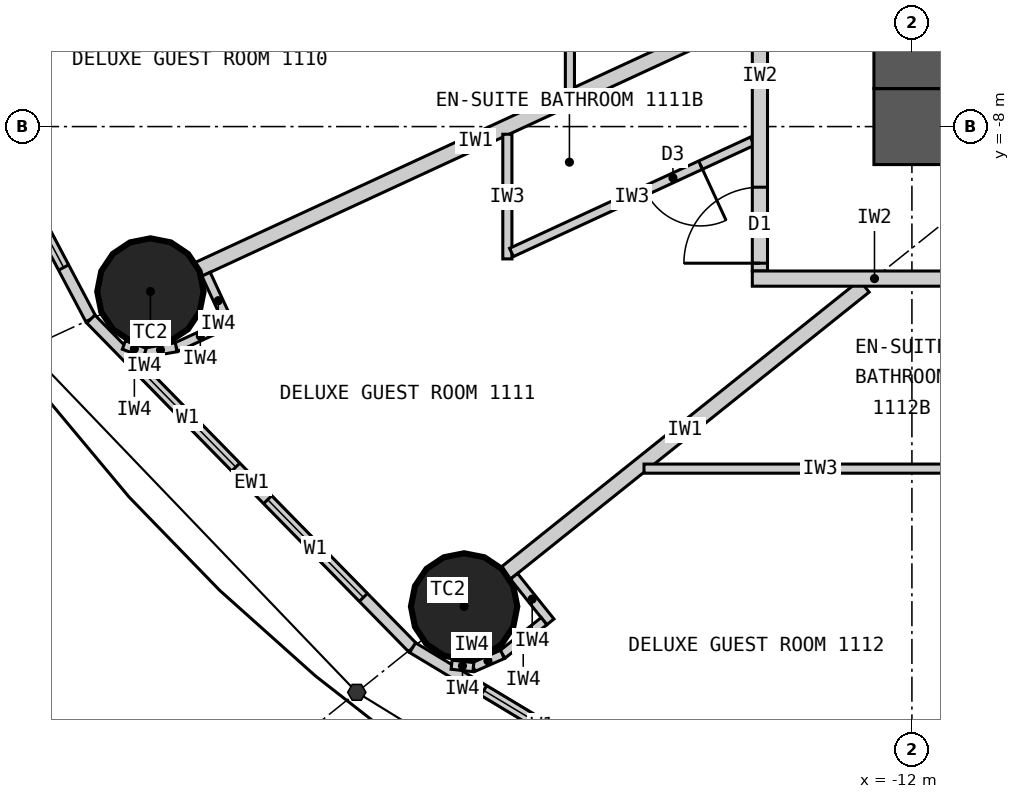
"""IFC4 building model, lengths in metres.
Left out: names, types, materials, properties, quantities, classifications, styles, units other than length and angle.
Written with IfcOpenShell. Run it as: python <this file> out.ifc"""

import sys

from ifc_helpers import new_model, si_unit, direction, frame, frame_2d, origin, origin_2d, place, context, subcontext, project, spatial, rectangle, circle, extrude, element, fill, save


model = new_model("IFC4")
c1 = context("Model", 3, precision=1e-05, world=origin(), true_north=direction((0.0, 1.0)))
c2 = subcontext(c1, "Body", "Model", "MODEL_VIEW")
j1 = project(units=[si_unit("LENGTHUNIT", "METRE"), si_unit("PLANEANGLEUNIT", "RADIAN")], contexts=[c1])
p1 = place(None, origin())
s1 = spatial("IfcSite", under=j1, at=p1, CompositionType="ELEMENT")
p2 = place(p1, origin())
s2 = spatial("IfcBuilding", under=s1, at=p2, CompositionType="ELEMENT")
p3 = place(p2, frame((0.0, 0.0, 50.7)))
s3 = spatial("IfcBuildingStorey", under=s2, at=p3, CompositionType="ELEMENT", Elevation=50.7)
for number, where, z_axis, x_axis in (
    (1, (-22.019, -10.17, 0.0), (0.0, 0.0, 1.0), (1.0, 0.0, 0.0)),
    (2, (-17.892, -14.313, 0.0), (0.0, 0.0, 1.0), (1.0, 0.0, 0.0)),
):
    element("IfcColumn", number, at=place(p3, frame(where, z_axis=z_axis, x_axis=x_axis)), inside=s3, PredefinedType="COLUMN", context=c2, shape_type="SweptSolid", body=[
        extrude(circle(Radius=0.7, at=origin_2d()), origin(), (0.0, 0.0, 1.0), 3.3),
    ])
p4 = place(p3, frame((12.5, -8.0, 0.0), z_axis=(0.0, 0.0, 1.0), x_axis=(-1.0, 0.0, 0.0)))
e3 = element("IfcWall", 3, at=p4, inside=s3, PredefinedType="SHEAR", context=c2, shape_type="SweptSolid", body=[
    extrude(rectangle(XDim=25.0, YDim=1.0, at=frame_2d((12.5, 0.0))), origin(), (0.0, 0.0, 1.0), 3.3),
])
p5 = place(p4, frame((11.2, 0.0, 0.0)))
e4 = element("IfcOpeningElement", 4, at=p5, cuts=e3, PredefinedType="OPENING", context=c2, shape_type="SweptSolid", body=[
    extrude(rectangle(XDim=1.2, YDim=2.2, at=frame_2d((0.6, 1.1))), frame((0.0, 0.51, 0.0), z_axis=(0.0, -1.0, 0.0), x_axis=(1.0, 0.0, 0.0)), (0.0, 0.0, 1.0), 1.02),
])
p6 = place(p4, frame((18.8, 0.0, 0.0)))
e5 = element("IfcOpeningElement", 5, at=p6, cuts=e3, PredefinedType="OPENING", context=c2, shape_type="SweptSolid", body=[
    extrude(rectangle(XDim=0.9, YDim=2.2, at=frame_2d((0.45, 1.1))), frame((0.0, 0.51, 0.0), z_axis=(0.0, -1.0, 0.0), x_axis=(1.0, 0.0, 0.0)), (0.0, 0.0, 1.0), 1.02),
])
p7 = place(p3, frame((-12.0, 7.5, 0.0), z_axis=(0.0, 0.0, 1.0), x_axis=(0.0, -1.0, 0.0)))
e6 = element("IfcWall", 6, at=p7, inside=s3, PredefinedType="SHEAR", context=c2, shape_type="SweptSolid", body=[
    extrude(rectangle(XDim=15.0, YDim=1.0, at=frame_2d((7.5, 0.0))), origin(), (0.0, 0.0, 1.0), 3.3),
])
p8 = place(p7, frame((6.6, 0.0, 0.0)))
e7 = element("IfcOpeningElement", 7, at=p8, cuts=e6, PredefinedType="OPENING", context=c2, shape_type="SweptSolid", body=[
    extrude(rectangle(XDim=1.8, YDim=2.2, at=frame_2d((0.9, 1.1))), frame((0.0, 0.51, 0.0), z_axis=(0.0, -1.0, 0.0), x_axis=(1.0, 0.0, 0.0)), (0.0, 0.0, 1.0), 1.02),
])
p9 = place(p3, frame((-25.482, -5.462, 0.0), z_axis=(0.0, 0.0, 1.0), x_axis=(0.467296867008, -0.884100468321, 0.0)))
e8 = element("IfcWall", 8, at=p9, inside=s3, PredefinedType="ELEMENTEDWALL", context=c2, shape_type="SweptSolid", body=[
    extrude(rectangle(XDim=5.734, YDim=0.15, at=frame_2d((2.867, 0.0))), origin(), (0.0, 0.0, 1.0), 3.12),
])
p10 = place(p9, frame((0.767, 0.0, 0.9)))
e9 = element("IfcOpeningElement", 9, at=p10, cuts=e8, PredefinedType="OPENING", context=c2, shape_type="SweptSolid", body=[
    extrude(rectangle(XDim=1.8, YDim=1.9, at=frame_2d((0.9, 0.95))), frame((0.0, 0.085, 0.0), z_axis=(0.0, -1.0, 0.0), x_axis=(1.0, 0.0, 0.0)), (0.0, 0.0, 1.0), 0.17),
])
p11 = place(p9, frame((3.167, 0.0, 0.9)))
e10 = element("IfcOpeningElement", 10, at=p11, cuts=e8, PredefinedType="OPENING", context=c2, shape_type="SweptSolid", body=[
    extrude(rectangle(XDim=1.8, YDim=1.9, at=frame_2d((0.9, 0.95))), frame((0.0, 0.085, 0.0), z_axis=(0.0, -1.0, 0.0), x_axis=(1.0, 0.0, 0.0)), (0.0, 0.0, 1.0), 0.17),
])
p12 = place(p3, frame((-22.803, -10.532, 0.0), z_axis=(0.0, 0.0, 1.0), x_axis=(0.699602905915, -0.714531856557, 0.0)))
e11 = element("IfcWall", 11, at=p12, inside=s3, PredefinedType="ELEMENTEDWALL", context=c2, shape_type="SweptSolid", body=[
    extrude(rectangle(XDim=6.051, YDim=0.15, at=frame_2d((3.025, 0.0))), origin(), (0.0, 0.0, 1.0), 3.12),
])
p13 = place(p12, frame((0.926, 0.0, 0.9)))
e12 = element("IfcOpeningElement", 12, at=p13, cuts=e11, PredefinedType="OPENING", context=c2, shape_type="SweptSolid", body=[
    extrude(rectangle(XDim=1.8, YDim=1.9, at=frame_2d((0.9, 0.95))), frame((0.0, 0.085, 0.0), z_axis=(0.0, -1.0, 0.0), x_axis=(1.0, 0.0, 0.0)), (0.0, 0.0, 1.0), 0.17),
])
p14 = place(p12, frame((3.325, 0.0, 0.9)))
e13 = element("IfcOpeningElement", 13, at=p14, cuts=e11, PredefinedType="OPENING", context=c2, shape_type="SweptSolid", body=[
    extrude(rectangle(XDim=1.8, YDim=1.9, at=frame_2d((0.9, 0.95))), frame((0.0, 0.085, 0.0), z_axis=(0.0, -1.0, 0.0), x_axis=(1.0, 0.0, 0.0)), (0.0, 0.0, 1.0), 0.17),
])
p15 = place(p3, frame((-18.57, -14.856, 0.0), z_axis=(0.0, 0.0, 1.0), x_axis=(0.856983180864, -0.515344377787, 0.0)))
e14 = element("IfcWall", 14, at=p15, inside=s3, PredefinedType="ELEMENTEDWALL", context=c2, shape_type="SweptSolid", body=[
    extrude(rectangle(XDim=6.386, YDim=0.15, at=frame_2d((3.193, 0.0))), origin(), (0.0, 0.0, 1.0), 3.12),
])
p16 = place(p15, frame((1.093, 0.0, 0.9)))
e15 = element("IfcOpeningElement", 15, at=p16, cuts=e14, PredefinedType="OPENING", context=c2, shape_type="SweptSolid", body=[
    extrude(rectangle(XDim=1.8, YDim=1.9, at=frame_2d((0.9, 0.95))), frame((0.0, 0.085, 0.0), z_axis=(0.0, -1.0, 0.0), x_axis=(1.0, 0.0, 0.0)), (0.0, 0.0, 1.0), 0.17),
])
p17 = place(p15, frame((3.493, 0.0, 0.9)))
e16 = element("IfcOpeningElement", 16, at=p17, cuts=e14, PredefinedType="OPENING", context=c2, shape_type="SweptSolid", body=[
    extrude(rectangle(XDim=1.8, YDim=1.9, at=frame_2d((0.9, 0.95))), frame((0.0, 0.085, 0.0), z_axis=(0.0, -1.0, 0.0), x_axis=(1.0, 0.0, 0.0)), (0.0, 0.0, 1.0), 0.17),
])
p18 = place(p3, frame((-14.1, -6.512, 0.0), z_axis=(0.0, 0.0, 1.0), x_axis=(-0.907832871056, -0.419332181247, 0.0)))
e17 = element("IfcWall", 17, at=p18, inside=s3, PredefinedType="PARTITIONING", context=c2, shape_type="SweptSolid", body=[
    extrude(rectangle(XDim=8.023, YDim=0.2, at=frame_2d((4.011, 0.0))), origin(), (0.0, 0.0, 1.0), 2.32),
])
p19 = place(p3, frame((-12.625, -10.1, 0.0), z_axis=(0.0, 0.0, 1.0), x_axis=(-0.780892451574, -0.624665493744, 0.0)))
e18 = element("IfcWall", 18, at=p19, inside=s3, PredefinedType="PARTITIONING", context=c2, shape_type="SweptSolid", body=[
    extrude(rectangle(XDim=6.045, YDim=0.2, at=frame_2d((3.022, 0.0))), origin(), (0.0, 0.0, 1.0), 2.32),
])
p20 = place(p3, frame((-7.289, -10.1, 0.0), z_axis=(0.0, 0.0, 1.0), x_axis=(-0.585198353053, -0.810890182197, 0.0)))
e19 = element("IfcWall", 19, at=p20, inside=s3, PredefinedType="PARTITIONING", context=c2, shape_type="SweptSolid", body=[
    extrude(rectangle(XDim=8.36, YDim=0.2, at=frame_2d((4.18, 0.0))), origin(), (0.0, 0.0, 1.0), 2.32),
])
p21 = place(p3, frame((-16.5, -7.521, 0.0), z_axis=(0.0, 0.0, 1.0), x_axis=(0.0, 1.0, 0.0)))
e20 = element("IfcWall", 20, at=p21, inside=s3, PredefinedType="PARTITIONING", context=c2, shape_type="SweptSolid", body=[
    extrude(rectangle(XDim=2.749, YDim=0.12, at=frame_2d((1.374, 0.0))), origin(), (0.0, 0.0, 1.0), 3.12),
])
p22 = place(p3, frame((-17.323, -8.101, 0.0), z_axis=(0.0, 0.0, 1.0), x_axis=(0.0, -1.0, 0.0)))
e21 = element("IfcWall", 21, at=p22, inside=s3, PredefinedType="PARTITIONING", context=c2, shape_type="SweptSolid", body=[
    extrude(rectangle(XDim=1.64, YDim=0.12, at=frame_2d((0.82, 0.0))), origin(), (0.0, 0.0, 1.0), 3.12),
])
p23 = place(p3, frame((-14.1, -8.193, 0.0), z_axis=(0.0, 0.0, 1.0), x_axis=(-0.907836493557, -0.419324338628, 0.0)))
e22 = element("IfcWall", 22, at=p23, inside=s3, PredefinedType="PARTITIONING", context=c2, shape_type="SweptSolid", body=[
    extrude(rectangle(XDim=3.49, YDim=0.12, at=frame_2d((1.745, 0.0))), origin(), (0.0, 0.0, 1.0), 3.12),
])
p24 = place(p23, frame((0.75, 0.0, 0.0)))
e23 = element("IfcOpeningElement", 23, at=p24, cuts=e22, PredefinedType="OPENING", context=c2, shape_type="SweptSolid", body=[
    extrude(rectangle(XDim=0.8, YDim=2.1, at=frame_2d((0.4, 1.05))), frame((0.0, 0.07, 0.0), z_axis=(0.0, -1.0, 0.0), x_axis=(1.0, 0.0, 0.0)), (0.0, 0.0, 1.0), 0.14),
])
p25 = place(p3, frame((-15.525, -12.5, 0.0), z_axis=(0.0, 0.0, 1.0), x_axis=(1.0, 0.0, 0.0)))
e24 = element("IfcWall", 24, at=p25, inside=s3, PredefinedType="PARTITIONING", context=c2, shape_type="SweptSolid", body=[
    extrude(rectangle(XDim=4.64, YDim=0.12, at=frame_2d((2.32, 0.0))), origin(), (0.0, 0.0, 1.0), 3.12),
])
p26 = place(p3, frame((-14.0, -4.772, 0.0), z_axis=(0.0, 0.0, 1.0), x_axis=(0.0, -1.0, 0.0)))
e25 = element("IfcWall", 25, at=p26, inside=s3, PredefinedType="PARTITIONING", context=c2, shape_type="SweptSolid", body=[
    extrude(rectangle(XDim=5.127, YDim=0.2, at=frame_2d((2.564, 0.0))), origin(), (0.0, 0.0, 1.0), 3.12),
])
p27 = place(p26, frame((4.025, 0.0, 0.0)))
e26 = element("IfcOpeningElement", 26, at=p27, cuts=e25, PredefinedType="OPENING", context=c2, shape_type="SweptSolid", body=[
    extrude(rectangle(XDim=1.0, YDim=2.2, at=frame_2d((0.5, 1.1))), frame((0.0, 0.11, 0.0), z_axis=(0.0, -1.0, 0.0), x_axis=(1.0, 0.0, 0.0)), (0.0, 0.0, 1.0), 0.22),
])
p28 = place(p3, frame((-10.885, -10.0, 0.0), z_axis=(0.0, 0.0, 1.0), x_axis=(-1.0, 0.0, 0.0)))
e27 = element("IfcWall", 27, at=p28, inside=s3, PredefinedType="PARTITIONING", context=c2, shape_type="SweptSolid", body=[
    extrude(rectangle(XDim=3.215, YDim=0.2, at=frame_2d((1.607, 0.0))), origin(), (0.0, 0.0, 1.0), 3.12),
])
p29 = place(p3, frame((-21.287, -9.942, 0.0), z_axis=(0.0, 0.0, 1.0), x_axis=(0.419259891039, -0.907866258744, 0.0)))
e28 = element("IfcWall", 28, at=p29, inside=s3, PredefinedType="PARTITIONING", context=c2, shape_type="SweptSolid", body=[
    extrude(rectangle(XDim=0.768, YDim=0.12, at=frame_2d((0.384, 0.0))), origin(), (0.0, 0.0, 1.0), 3.12),
])
p30 = place(p3, frame((-21.045, -10.61, 0.0), z_axis=(0.0, 0.0, 1.0), x_axis=(-0.907877701396, -0.419235112208, 0.0)))
e29 = element("IfcWall", 29, at=p30, inside=s3, PredefinedType="PARTITIONING", context=c2, shape_type="SweptSolid", body=[
    extrude(rectangle(XDim=0.7, YDim=0.12, at=frame_2d((0.35, 0.0))), origin(), (0.0, 0.0, 1.0), 3.12),
])
p31 = place(p3, frame((-21.68, -10.903, 0.0), z_axis=(0.0, 0.0, 1.0), x_axis=(-0.985446622073, -0.169985161247, 0.0)))
e30 = element("IfcWall", 30, at=p31, inside=s3, PredefinedType="PARTITIONING", context=c2, shape_type="SweptSolid", body=[
    extrude(rectangle(XDim=0.418, YDim=0.12, at=frame_2d((0.209, 0.0))), origin(), (0.0, 0.0, 1.0), 3.12),
])
p32 = place(p3, frame((-22.092, -10.974, 0.0), z_axis=(0.0, 0.0, 1.0), x_axis=(-0.938428160676, 0.345474437912, 0.0)))
e31 = element("IfcWall", 31, at=p32, inside=s3, PredefinedType="PARTITIONING", context=c2, shape_type="SweptSolid", body=[
    extrude(rectangle(XDim=0.294, YDim=0.12, at=frame_2d((0.147, 0.0))), origin(), (0.0, 0.0, 1.0), 3.12),
])
p33 = place(p3, frame((-17.236, -13.917, 0.0), z_axis=(0.0, 0.0, 1.0), x_axis=(0.624695047554, -0.780868809443, 0.0)))
e32 = element("IfcWall", 32, at=p33, inside=s3, PredefinedType="PARTITIONING", context=c2, shape_type="SweptSolid", body=[
    extrude(rectangle(XDim=0.768, YDim=0.12, at=frame_2d((0.384, 0.0))), origin(), (0.0, 0.0, 1.0), 3.12),
])
p34 = place(p3, frame((-16.841, -14.507, 0.0), z_axis=(0.0, 0.0, 1.0), x_axis=(-0.780902834923, -0.62465251333, 0.0)))
e33 = element("IfcWall", 33, at=p34, inside=s3, PredefinedType="PARTITIONING", context=c2, shape_type="SweptSolid", body=[
    extrude(rectangle(XDim=0.7, YDim=0.12, at=frame_2d((0.35, 0.0))), origin(), (0.0, 0.0, 1.0), 3.12),
])
p35 = place(p3, frame((-17.387, -14.944, 0.0), z_axis=(0.0, 0.0, 1.0), x_axis=(-0.916036698064, -0.401094462441, 0.0)))
e34 = element("IfcWall", 34, at=p35, inside=s3, PredefinedType="PARTITIONING", context=c2, shape_type="SweptSolid", body=[
    extrude(rectangle(XDim=0.418, YDim=0.12, at=frame_2d((0.209, 0.0))), origin(), (0.0, 0.0, 1.0), 3.12),
])
p36 = place(p3, frame((-17.77, -15.112, 0.0), z_axis=(0.0, 0.0, 1.0), x_axis=(-0.993904401174, 0.110245368731, 0.0)))
e35 = element("IfcWall", 35, at=p36, inside=s3, PredefinedType="PARTITIONING", context=c2, shape_type="SweptSolid", body=[
    extrude(rectangle(XDim=0.288, YDim=0.12, at=frame_2d((0.144, 0.0))), origin(), (0.0, 0.0, 1.0), 3.12),
])
p37 = place(p11, origin())
e36 = element("IfcWindow", 36, at=p37, inside=s3, PartitioningType="SINGLE_PANEL", PredefinedType="WINDOW", context=c2, shape_type="SweptSolid", body=[
    extrude(rectangle(XDim=1.8, YDim=1.9, at=frame_2d((0.9, 0.95))), frame((0.0, 0.03, 0.0), z_axis=(0.0, -1.0, 0.0), x_axis=(1.0, 0.0, 0.0)), (0.0, 0.0, 1.0), 0.06),
])
fill(e10, e36)
p38 = place(p13, origin())
e37 = element("IfcWindow", 37, at=p38, inside=s3, PartitioningType="SINGLE_PANEL", PredefinedType="WINDOW", context=c2, shape_type="SweptSolid", body=[
    extrude(rectangle(XDim=1.8, YDim=1.9, at=frame_2d((0.9, 0.95))), frame((0.0, 0.03, 0.0), z_axis=(0.0, -1.0, 0.0), x_axis=(1.0, 0.0, 0.0)), (0.0, 0.0, 1.0), 0.06),
])
fill(e12, e37)
p39 = place(p14, origin())
e38 = element("IfcWindow", 38, at=p39, inside=s3, PartitioningType="SINGLE_PANEL", PredefinedType="WINDOW", context=c2, shape_type="SweptSolid", body=[
    extrude(rectangle(XDim=1.8, YDim=1.9, at=frame_2d((0.9, 0.95))), frame((0.0, 0.03, 0.0), z_axis=(0.0, -1.0, 0.0), x_axis=(1.0, 0.0, 0.0)), (0.0, 0.0, 1.0), 0.06),
])
fill(e13, e38)
p40 = place(p16, origin())
e39 = element("IfcWindow", 39, at=p40, inside=s3, PartitioningType="SINGLE_PANEL", PredefinedType="WINDOW", context=c2, shape_type="SweptSolid", body=[
    extrude(rectangle(XDim=1.8, YDim=1.9, at=frame_2d((0.9, 0.95))), frame((0.0, 0.03, 0.0), z_axis=(0.0, -1.0, 0.0), x_axis=(1.0, 0.0, 0.0)), (0.0, 0.0, 1.0), 0.06),
])
fill(e15, e39)
p41 = place(p24, origin())
e40 = element("IfcDoor", 40, at=p41, inside=s3, OperationType="SINGLE_SWING_LEFT", PredefinedType="DOOR", context=c2, shape_type="SweptSolid", body=[
    extrude(rectangle(XDim=0.8, YDim=2.1, at=frame_2d((0.4, 1.05))), frame((0.0, 0.025, 0.0), z_axis=(0.0, -1.0, 0.0), x_axis=(1.0, 0.0, 0.0)), (0.0, 0.0, 1.0), 0.05),
])
fill(e23, e40)
p42 = place(p27, origin())
e41 = element("IfcDoor", 41, at=p42, inside=s3, OperationType="SINGLE_SWING_RIGHT", PredefinedType="DOOR", context=c2, shape_type="SweptSolid", body=[
    extrude(rectangle(XDim=1.0, YDim=2.2, at=frame_2d((0.5, 1.1))), frame((0.0, 0.025, 0.0), z_axis=(0.0, -1.0, 0.0), x_axis=(1.0, 0.0, 0.0)), (0.0, 0.0, 1.0), 0.05),
])
fill(e26, e41)
save(model, sys.argv[1])
